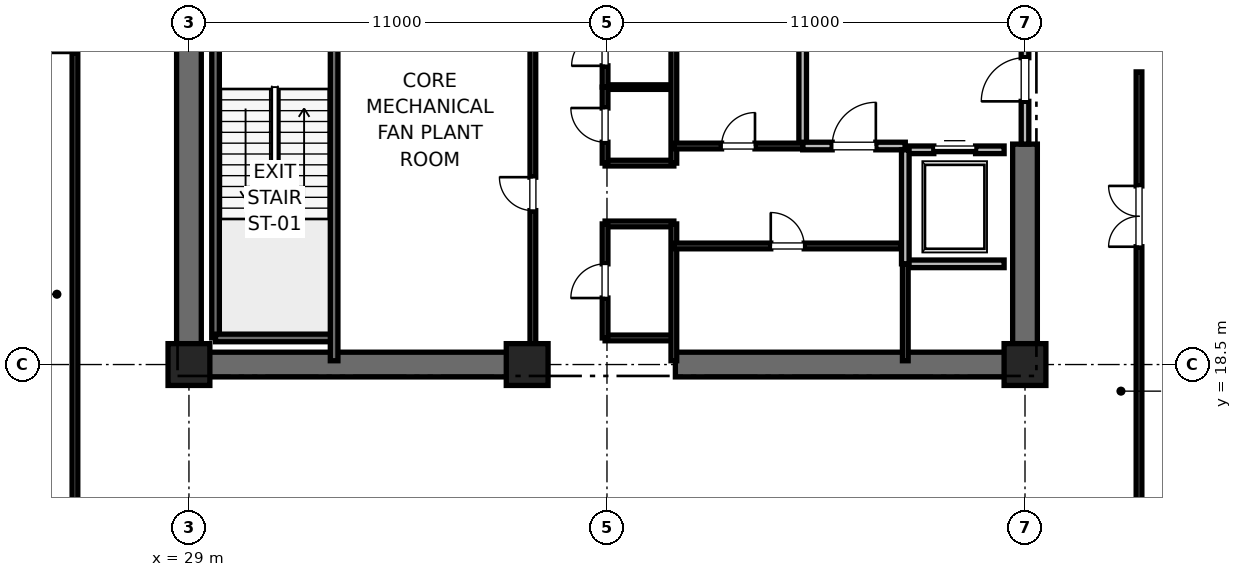
"""IFC4 building model, lengths in metres.
Left out: names, types, materials, properties, quantities, classifications, styles, units other than length and angle.
Written with IfcOpenShell. Run it as: python <this file> out.ifc"""

import sys

from ifc_helpers import new_model, si_unit, direction, frame, frame_2d, origin, origin_2d, place, context, subcontext, project, spatial, rectangle, extrude, element, fill, save


model = new_model("IFC4")
c1 = context("Model", 3, precision=1e-05, world=origin(), true_north=direction((0.0, 1.0)))
c2 = subcontext(c1, "Body", "Model", "MODEL_VIEW")
j1 = project(units=[si_unit("LENGTHUNIT", "METRE"), si_unit("PLANEANGLEUNIT", "RADIAN")], contexts=[c1])
p1 = place(None, origin())
s1 = spatial("IfcSite", under=j1, at=p1, CompositionType="ELEMENT")
p2 = place(p1, origin())
s2 = spatial("IfcBuilding", under=s1, at=p2, CompositionType="ELEMENT")
p3 = place(p2, frame((0.0, 0.0, -9.0)))
s3 = spatial("IfcBuildingStorey", under=s2, at=p3, CompositionType="ELEMENT", Elevation=-9.0)
for number, where, z_axis, x_axis in (
    (1, (29.0, 18.5, -0.3), (0.0, 0.0, 1.0), (1.0, 0.0, 0.0)),
    (2, (51.0, 18.5, -0.3), (0.0, 0.0, 1.0), (1.0, 0.0, 0.0)),
    (3, (37.9, 18.5, -0.3), (0.0, 0.0, 1.0), (1.0, 0.0, 0.0)),
):
    element("IfcColumn", number, at=place(p3, frame(where, z_axis=z_axis, x_axis=x_axis)), inside=s3, PredefinedType="PILASTER", context=c2, shape_type="SweptSolid", body=[
        extrude(rectangle(XDim=1.1, YDim=1.1, at=origin_2d()), origin(), (0.0, 0.0, 1.0), 4.8),
    ])
for number, where, z_axis, x_axis in (
    (4, (29.0, 18.5, -0.3), (0.0, 0.0, 1.0), (1.0, 0.0, 0.0)),
    (5, (41.8, 18.5, -0.3), (0.0, 0.0, 1.0), (1.0, 0.0, 0.0)),
):
    element("IfcWall", number, at=place(p3, frame(where, z_axis=z_axis, x_axis=x_axis)), inside=s3, PredefinedType="SHEAR", context=c2, shape_type="SweptSolid", body=[
        extrude(rectangle(XDim=9.2, YDim=0.65, at=frame_2d((4.6, 0.0))), origin(), (0.0, 0.0, 1.0), 4.5),
    ])
p4 = place(p3, frame((29.0, 18.5, -0.3), z_axis=(0.0, 0.0, 1.0), x_axis=(0.0, 1.0, 0.0)))
e6 = element("IfcWall", 6, at=p4, inside=s3, PredefinedType="SHEAR", context=c2, shape_type="SweptSolid", body=[
    extrude(rectangle(XDim=8.8, YDim=0.65, at=frame_2d((4.4, 0.0))), origin(), (0.0, 0.0, 1.0), 4.5),
])
p5 = place(p3, frame((51.0, 18.5, -0.3), z_axis=(0.0, 0.0, 1.0), x_axis=(0.0, 1.0, 0.0)))
e7 = element("IfcWall", 7, at=p5, inside=s3, PredefinedType="SHEAR", context=c2, shape_type="SweptSolid", body=[
    extrude(rectangle(XDim=5.8, YDim=0.65, at=frame_2d((2.9, 0.0))), origin(), (0.0, 0.0, 1.0), 4.5),
])
p6 = place(p3, frame((29.7, 19.2, -0.3), z_axis=(0.0, 0.0, 1.0), x_axis=(0.0, 1.0, 0.0)))
e8 = element("IfcWall", 8, at=p6, inside=s3, PredefinedType="SOLIDWALL", context=c2, shape_type="SweptSolid", body=[
    extrude(rectangle(XDim=8.15, YDim=0.2, at=frame_2d((4.075, 0.0))), origin(), (0.0, 0.0, 1.0), 4.5),
])
p7 = place(p3, frame((29.7, 19.2, -0.3), z_axis=(0.0, 0.0, 1.0), x_axis=(1.0, 0.0, 0.0)))
e9 = element("IfcWall", 9, at=p7, inside=s3, PredefinedType="SOLIDWALL", context=c2, shape_type="SweptSolid", body=[
    extrude(rectangle(XDim=3.12, YDim=0.2, at=frame_2d((1.56, 0.0))), origin(), (0.0, 0.0, 1.0), 4.5),
])
p8 = place(p3, frame((32.82, 18.6, -0.3), z_axis=(0.0, 0.0, 1.0), x_axis=(0.0, 1.0, 0.0)))
e10 = element("IfcWall", 10, at=p8, inside=s3, PredefinedType="SOLIDWALL", context=c2, shape_type="SweptSolid", body=[
    extrude(rectangle(XDim=8.78, YDim=0.2, at=frame_2d((4.39, 0.0))), origin(), (0.0, 0.0, 1.0), 4.5),
])
p9 = place(p3, frame((45.15, 24.25, 0.0), z_axis=(0.0, 0.0, 1.0), x_axis=(0.0, 1.0, 0.0)))
e11 = element("IfcWall", 11, at=p9, inside=s3, PredefinedType="PARTITIONING", context=c2, shape_type="SweptSolid", body=[
    extrude(rectangle(XDim=3.37, YDim=0.2, at=frame_2d((1.685, 0.0))), origin(), (0.0, 0.0, 1.0), 4.2),
])
p10 = place(p3, frame((45.15, 24.25, 0.0), z_axis=(0.0, 0.0, 1.0), x_axis=(1.0, 0.0, 0.0)))
e12 = element("IfcWall", 12, at=p10, inside=s3, PredefinedType="PARTITIONING", context=c2, shape_type="SweptSolid", body=[
    extrude(rectangle(XDim=2.7, YDim=0.2, at=frame_2d((1.35, 0.0))), origin(), (0.0, 0.0, 1.0), 4.2),
])
p11 = place(p10, frame((0.775, 0.0, 0.0)))
e13 = element("IfcOpeningElement", 13, at=p11, cuts=e12, PredefinedType="OPENING", context=c2, shape_type="SweptSolid", body=[
    extrude(rectangle(XDim=1.15, YDim=2.2, at=frame_2d((0.575, 1.1))), frame((0.0, 0.1, 0.0), z_axis=(0.0, -1.0, 0.0), x_axis=(1.0, 0.0, 0.0)), (0.0, 0.0, 1.0), 0.2),
])
p12 = place(p3, frame((51.0, 24.3, 0.0), z_axis=(0.0, 0.0, 1.0), x_axis=(0.0, 1.0, 0.0)))
e14 = element("IfcWall", 14, at=p12, inside=s3, PredefinedType="PARTITIONING", context=c2, shape_type="SweptSolid", body=[
    extrude(rectangle(XDim=3.4, YDim=0.2, at=frame_2d((1.7, 0.0))), origin(), (0.0, 0.0, 1.0), 2.98),
])
p13 = place(p12, frame((1.125, 0.0, 0.0)))
e15 = element("IfcOpeningElement", 15, at=p13, cuts=e14, PredefinedType="OPENING", context=c2, shape_type="SweptSolid", body=[
    extrude(rectangle(XDim=1.15, YDim=2.2, at=frame_2d((0.575, 1.1))), frame((0.0, 0.1, 0.0), z_axis=(0.0, -1.0, 0.0), x_axis=(1.0, 0.0, 0.0)), (0.0, 0.0, 1.0), 0.2),
])
p14 = place(p3, frame((47.85, 21.15, 0.0), z_axis=(0.0, 0.0, 1.0), x_axis=(1.0, 0.0, 0.0)))
e16 = element("IfcWall", 16, at=p14, inside=s3, PredefinedType="SOLIDWALL", context=c2, shape_type="SweptSolid", body=[
    extrude(rectangle(XDim=2.6, YDim=0.2, at=frame_2d((1.3, 0.0))), origin(), (0.0, 0.0, 1.0), 4.2),
])
p15 = place(p3, frame((50.45, 24.15, 0.0), z_axis=(0.0, 0.0, 1.0), x_axis=(-1.0, 0.0, 0.0)))
e17 = element("IfcWall", 17, at=p15, inside=s3, PredefinedType="SOLIDWALL", context=c2, shape_type="SweptSolid", body=[
    extrude(rectangle(XDim=2.6, YDim=0.2, at=frame_2d((1.3, 0.0))), origin(), (0.0, 0.0, 1.0), 2.98),
])
p16 = place(p15, frame((0.75, 0.0, 0.0)))
e18 = element("IfcOpeningElement", 18, at=p16, cuts=e17, PredefinedType="OPENING", context=c2, shape_type="SweptSolid", body=[
    extrude(rectangle(XDim=1.1, YDim=2.2, at=frame_2d((0.55, 1.1))), frame((0.0, 0.1, 0.0), z_axis=(0.0, -1.0, 0.0), x_axis=(1.0, 0.0, 0.0)), (0.0, 0.0, 1.0), 0.2),
])
p17 = place(p3, frame((47.85, 24.15, 0.0), z_axis=(0.0, 0.0, 1.0), x_axis=(0.0, -1.0, 0.0)))
e19 = element("IfcWall", 19, at=p17, inside=s3, PredefinedType="SOLIDWALL", context=c2, shape_type="SweptSolid", body=[
    extrude(rectangle(XDim=3.0, YDim=0.2, at=frame_2d((1.5, 0.0))), origin(), (0.0, 0.0, 1.0), 4.2),
])
for number, where, z_axis, x_axis in (
    (20, (39.95, 19.2, 0.0), (0.0, 0.0, 1.0), (1.0, 0.0, 0.0)),
    (21, (39.95, 22.2, 0.0), (0.0, 0.0, 1.0), (1.0, 0.0, 0.0)),
    (22, (39.95, 23.8, 0.0), (0.0, 0.0, 1.0), (1.0, 0.0, 0.0)),
):
    element("IfcWall", number, at=place(p3, frame(where, z_axis=z_axis, x_axis=x_axis)), inside=s3, PredefinedType="PARTITIONING", context=c2, shape_type="SweptSolid", body=[
        extrude(rectangle(XDim=1.81, YDim=0.15, at=frame_2d((0.905, 0.0))), origin(), (0.0, 0.0, 1.0), 2.85),
    ])
p18 = place(p3, frame((39.95, 25.8, 0.0), z_axis=(0.0, 0.0, 1.0), x_axis=(1.0, 0.0, 0.0)))
e23 = element("IfcWall", 23, at=p18, inside=s3, PredefinedType="PARTITIONING", context=c2, shape_type="SweptSolid", body=[
    extrude(rectangle(XDim=1.81, YDim=0.12, at=frame_2d((0.905, 0.0))), origin(), (0.0, 0.0, 1.0), 2.85),
])
p19 = place(p3, frame((41.76, 18.6, 0.0), z_axis=(0.0, 0.0, 1.0), x_axis=(0.0, 1.0, 0.0)))
e24 = element("IfcWall", 24, at=p19, inside=s3, PredefinedType="PARTITIONING", context=c2, shape_type="SweptSolid", body=[
    extrude(rectangle(XDim=3.6, YDim=0.15, at=frame_2d((1.8, 0.0))), origin(), (0.0, 0.0, 1.0), 2.85),
])
p20 = place(p3, frame((41.76, 23.8, 0.0), z_axis=(0.0, 0.0, 1.0), x_axis=(0.0, 1.0, 0.0)))
e25 = element("IfcWall", 25, at=p20, inside=s3, PredefinedType="PARTITIONING", context=c2, shape_type="SweptSolid", body=[
    extrude(rectangle(XDim=4.0, YDim=0.15, at=frame_2d((2.0, 0.0))), origin(), (0.0, 0.0, 1.0), 2.85),
])
p21 = place(p3, frame((39.95, 19.2, 0.0), z_axis=(0.0, 0.0, 1.0), x_axis=(0.0, 1.0, 0.0)))
e26 = element("IfcWall", 26, at=p21, inside=s3, PredefinedType="PARTITIONING", context=c2, shape_type="SweptSolid", body=[
    extrude(rectangle(XDim=3.0, YDim=0.15, at=frame_2d((1.5, 0.0))), origin(), (0.0, 0.0, 1.0), 2.85),
])
p22 = place(p21, frame((1.05, 0.0, 0.0)))
e27 = element("IfcOpeningElement", 27, at=p22, cuts=e26, PredefinedType="OPENING", context=c2, shape_type="SweptSolid", body=[
    extrude(rectangle(XDim=0.9, YDim=2.1, at=frame_2d((0.45, 1.05))), frame((0.0, 0.075, 0.0), z_axis=(0.0, -1.0, 0.0), x_axis=(1.0, 0.0, 0.0)), (0.0, 0.0, 1.0), 0.15),
])
p23 = place(p3, frame((39.95, 23.8, 0.0), z_axis=(0.0, 0.0, 1.0), x_axis=(0.0, 1.0, 0.0)))
e28 = element("IfcWall", 28, at=p23, inside=s3, PredefinedType="PARTITIONING", context=c2, shape_type="SweptSolid", body=[
    extrude(rectangle(XDim=2.0, YDim=0.15, at=frame_2d((1.0, 0.0))), origin(), (0.0, 0.0, 1.0), 2.85),
])
p24 = place(p23, frame((0.55, 0.0, 0.0)))
e29 = element("IfcOpeningElement", 29, at=p24, cuts=e28, PredefinedType="OPENING", context=c2, shape_type="SweptSolid", body=[
    extrude(rectangle(XDim=0.9, YDim=2.1, at=frame_2d((0.45, 1.05))), frame((0.0, 0.075, 0.0), z_axis=(0.0, -1.0, 0.0), x_axis=(1.0, 0.0, 0.0)), (0.0, 0.0, 1.0), 0.15),
])
p25 = place(p3, frame((39.95, 25.8, 0.0), z_axis=(0.0, 0.0, 1.0), x_axis=(0.0, 1.0, 0.0)))
e30 = element("IfcWall", 30, at=p25, inside=s3, PredefinedType="PARTITIONING", context=c2, shape_type="SweptSolid", body=[
    extrude(rectangle(XDim=2.0, YDim=0.15, at=frame_2d((1.0, 0.0))), origin(), (0.0, 0.0, 1.0), 2.85),
])
p26 = place(p25, frame((0.56, 0.0, 0.0)))
e31 = element("IfcOpeningElement", 31, at=p26, cuts=e30, PredefinedType="OPENING", context=c2, shape_type="SweptSolid", body=[
    extrude(rectangle(XDim=0.88, YDim=2.1, at=frame_2d((0.44, 1.05))), frame((0.0, 0.075, 0.0), z_axis=(0.0, -1.0, 0.0), x_axis=(1.0, 0.0, 0.0)), (0.0, 0.0, 1.0), 0.15),
])
p27 = place(p3, frame((38.05, 18.6, 0.0), z_axis=(0.0, 0.0, 1.0), x_axis=(0.0, 1.0, 0.0)))
e32 = element("IfcWall", 32, at=p27, inside=s3, PredefinedType="PARTITIONING", context=c2, shape_type="SweptSolid", body=[
    extrude(rectangle(XDim=8.78, YDim=0.15, at=frame_2d((4.39, 0.0))), origin(), (0.0, 0.0, 1.0), 2.85),
])
p28 = place(p27, frame((3.95, 0.0, 0.0)))
e33 = element("IfcOpeningElement", 33, at=p28, cuts=e32, PredefinedType="OPENING", context=c2, shape_type="SweptSolid", body=[
    extrude(rectangle(XDim=0.88, YDim=2.1, at=frame_2d((0.44, 1.05))), frame((0.0, 0.075, 0.0), z_axis=(0.0, -1.0, 0.0), x_axis=(1.0, 0.0, 0.0)), (0.0, 0.0, 1.0), 0.15),
])
p29 = place(p3, frame((47.85, 18.6, 0.0), z_axis=(0.0, 0.0, 1.0), x_axis=(0.0, 1.0, 0.0)))
e34 = element("IfcWall", 34, at=p29, inside=s3, PredefinedType="PARTITIONING", context=c2, shape_type="SweptSolid", body=[
    extrude(rectangle(XDim=2.54, YDim=0.15, at=frame_2d((1.27, 0.0))), origin(), (0.0, 0.0, 1.0), 2.85),
])
p30 = place(p3, frame((41.76, 21.62, 0.0), z_axis=(0.0, 0.0, 1.0), x_axis=(1.0, 0.0, 0.0)))
e35 = element("IfcWall", 35, at=p30, inside=s3, PredefinedType="PARTITIONING", context=c2, shape_type="SweptSolid", body=[
    extrude(rectangle(XDim=5.98, YDim=0.15, at=frame_2d((2.99, 0.0))), origin(), (0.0, 0.0, 1.0), 2.85),
])
p31 = place(p30, frame((2.55, 0.0, 0.0)))
e36 = element("IfcOpeningElement", 36, at=p31, cuts=e35, PredefinedType="OPENING", context=c2, shape_type="SweptSolid", body=[
    extrude(rectangle(XDim=0.88, YDim=2.1, at=frame_2d((0.44, 1.05))), frame((0.0, 0.075, 0.0), z_axis=(0.0, -1.0, 0.0), x_axis=(1.0, 0.0, 0.0)), (0.0, 0.0, 1.0), 0.15),
])
p32 = place(p3, frame((41.76, 24.25, 0.0), z_axis=(0.0, 0.0, 1.0), x_axis=(1.0, 0.0, 0.0)))
e37 = element("IfcWall", 37, at=p32, inside=s3, PredefinedType="PARTITIONING", context=c2, shape_type="SweptSolid", body=[
    extrude(rectangle(XDim=3.39, YDim=0.15, at=frame_2d((1.695, 0.0))), origin(), (0.0, 0.0, 1.0), 2.85),
])
p33 = place(p32, frame((1.255, 0.0, 0.0)))
e38 = element("IfcOpeningElement", 38, at=p33, cuts=e37, PredefinedType="OPENING", context=c2, shape_type="SweptSolid", body=[
    extrude(rectangle(XDim=0.88, YDim=2.1, at=frame_2d((0.44, 1.05))), frame((0.0, 0.075, 0.0), z_axis=(0.0, -1.0, 0.0), x_axis=(1.0, 0.0, 0.0)), (0.0, 0.0, 1.0), 0.15),
])
p34 = place(p3, frame((26.0, 14.0, 0.0), z_axis=(0.0, 0.0, 1.0), x_axis=(0.0, 1.0, 0.0)))
e39 = element("IfcWall", 39, at=p34, inside=s3, PredefinedType="PARTITIONING", context=c2, shape_type="SweptSolid", body=[
    extrude(rectangle(XDim=25.0, YDim=0.15, at=frame_2d((12.5, 0.0))), origin(), (0.0, 0.0, 1.0), 2.85),
])
p35 = place(p34, frame((12.7, 0.0, 0.0)))
e40 = element("IfcOpeningElement", 40, at=p35, cuts=e39, PredefinedType="OPENING", context=c2, shape_type="SweptSolid", body=[
    extrude(rectangle(XDim=1.6, YDim=2.25, at=frame_2d((0.8, 1.125))), frame((0.0, 0.075, 0.0), z_axis=(0.0, -1.0, 0.0), x_axis=(1.0, 0.0, 0.0)), (0.0, 0.0, 1.0), 0.15),
])
p36 = place(p3, frame((54.0, 14.0, 0.0), z_axis=(0.0, 0.0, 1.0), x_axis=(0.0, 1.0, 0.0)))
e41 = element("IfcWall", 41, at=p36, inside=s3, PredefinedType="PARTITIONING", context=c2, shape_type="SweptSolid", body=[
    extrude(rectangle(XDim=12.2, YDim=0.15, at=frame_2d((6.1, 0.0))), origin(), (0.0, 0.0, 1.0), 2.85),
])
p37 = place(p36, frame((7.6, 0.0, 0.0)))
e42 = element("IfcOpeningElement", 42, at=p37, cuts=e41, PredefinedType="OPENING", context=c2, shape_type="SweptSolid", body=[
    extrude(rectangle(XDim=1.6, YDim=2.25, at=frame_2d((0.8, 1.125))), frame((0.0, 0.075, 0.0), z_axis=(0.0, -1.0, 0.0), x_axis=(1.0, 0.0, 0.0)), (0.0, 0.0, 1.0), 0.15),
])
p38 = place(p11, origin())
e43 = element("IfcDoor", 43, at=p38, inside=s3, OperationType="SINGLE_SWING_RIGHT", PredefinedType="DOOR", context=c2, shape_type="SweptSolid", body=[
    extrude(rectangle(XDim=1.15, YDim=2.2, at=frame_2d((0.575, 1.1))), frame((0.0, 0.025, 0.0), z_axis=(0.0, -1.0, 0.0), x_axis=(1.0, 0.0, 0.0)), (0.0, 0.0, 1.0), 0.05),
])
fill(e13, e43)
p39 = place(p13, origin())
e44 = element("IfcDoor", 44, at=p39, inside=s3, OperationType="SINGLE_SWING_LEFT", PredefinedType="DOOR", context=c2, shape_type="SweptSolid", body=[
    extrude(rectangle(XDim=1.15, YDim=2.2, at=frame_2d((0.575, 1.1))), frame((0.0, 0.025, 0.0), z_axis=(0.0, -1.0, 0.0), x_axis=(1.0, 0.0, 0.0)), (0.0, 0.0, 1.0), 0.05),
])
fill(e15, e44)
p40 = place(p16, origin())
e45 = element("IfcDoor", 45, at=p40, inside=s3, OperationType="SLIDING_TO_RIGHT", PredefinedType="DOOR", context=c2, shape_type="SweptSolid", body=[
    extrude(rectangle(XDim=1.1, YDim=2.2, at=frame_2d((0.55, 1.1))), frame((0.0, 0.025, 0.0), z_axis=(0.0, -1.0, 0.0), x_axis=(1.0, 0.0, 0.0)), (0.0, 0.0, 1.0), 0.05),
])
fill(e18, e45)
p41 = place(p22, origin())
e46 = element("IfcDoor", 46, at=p41, inside=s3, OperationType="SINGLE_SWING_LEFT", PredefinedType="DOOR", context=c2, shape_type="SweptSolid", body=[
    extrude(rectangle(XDim=0.9, YDim=2.1, at=frame_2d((0.45, 1.05))), frame((0.0, 0.025, 0.0), z_axis=(0.0, -1.0, 0.0), x_axis=(1.0, 0.0, 0.0)), (0.0, 0.0, 1.0), 0.05),
])
fill(e27, e46)
p42 = place(p24, origin())
e47 = element("IfcDoor", 47, at=p42, inside=s3, OperationType="SINGLE_SWING_RIGHT", PredefinedType="DOOR", context=c2, shape_type="SweptSolid", body=[
    extrude(rectangle(XDim=0.9, YDim=2.1, at=frame_2d((0.45, 1.05))), frame((0.0, 0.025, 0.0), z_axis=(0.0, -1.0, 0.0), x_axis=(1.0, 0.0, 0.0)), (0.0, 0.0, 1.0), 0.05),
])
fill(e29, e47)
p43 = place(p26, origin())
e48 = element("IfcDoor", 48, at=p43, inside=s3, OperationType="SINGLE_SWING_LEFT", PredefinedType="DOOR", context=c2, shape_type="SweptSolid", body=[
    extrude(rectangle(XDim=0.88, YDim=2.1, at=frame_2d((0.44, 1.05))), frame((0.0, 0.025, 0.0), z_axis=(0.0, -1.0, 0.0), x_axis=(1.0, 0.0, 0.0)), (0.0, 0.0, 1.0), 0.05),
])
fill(e31, e48)
p44 = place(p28, origin())
e49 = element("IfcDoor", 49, at=p44, inside=s3, OperationType="SINGLE_SWING_RIGHT", PredefinedType="DOOR", context=c2, shape_type="SweptSolid", body=[
    extrude(rectangle(XDim=0.88, YDim=2.1, at=frame_2d((0.44, 1.05))), frame((0.0, 0.025, 0.0), z_axis=(0.0, -1.0, 0.0), x_axis=(1.0, 0.0, 0.0)), (0.0, 0.0, 1.0), 0.05),
])
fill(e33, e49)
p45 = place(p31, origin())
e50 = element("IfcDoor", 50, at=p45, inside=s3, OperationType="SINGLE_SWING_LEFT", PredefinedType="DOOR", context=c2, shape_type="SweptSolid", body=[
    extrude(rectangle(XDim=0.88, YDim=2.1, at=frame_2d((0.44, 1.05))), frame((0.0, 0.025, 0.0), z_axis=(0.0, -1.0, 0.0), x_axis=(1.0, 0.0, 0.0)), (0.0, 0.0, 1.0), 0.05),
])
fill(e36, e50)
p46 = place(p33, origin())
e51 = element("IfcDoor", 51, at=p46, inside=s3, OperationType="SINGLE_SWING_RIGHT", PredefinedType="DOOR", context=c2, shape_type="SweptSolid", body=[
    extrude(rectangle(XDim=0.88, YDim=2.1, at=frame_2d((0.44, 1.05))), frame((0.0, 0.025, 0.0), z_axis=(0.0, -1.0, 0.0), x_axis=(1.0, 0.0, 0.0)), (0.0, 0.0, 1.0), 0.05),
])
fill(e38, e51)
p47 = place(p35, origin())
e52 = element("IfcDoor", 52, at=p47, inside=s3, OperationType="DOUBLE_DOOR_SINGLE_SWING", PredefinedType="DOOR", context=c2, shape_type="SweptSolid", body=[
    extrude(rectangle(XDim=1.6, YDim=2.25, at=frame_2d((0.8, 1.125))), frame((0.0, 0.025, 0.0), z_axis=(0.0, -1.0, 0.0), x_axis=(1.0, 0.0, 0.0)), (0.0, 0.0, 1.0), 0.05),
])
fill(e40, e52)
p48 = place(p37, origin())
e53 = element("IfcDoor", 53, at=p48, inside=s3, OperationType="DOUBLE_DOOR_SINGLE_SWING", PredefinedType="DOOR", context=c2, shape_type="SweptSolid", body=[
    extrude(rectangle(XDim=1.6, YDim=2.25, at=frame_2d((0.8, 1.125))), frame((0.0, 0.025, 0.0), z_axis=(0.0, -1.0, 0.0), x_axis=(1.0, 0.0, 0.0)), (0.0, 0.0, 1.0), 0.05),
])
fill(e42, e53)
save(model, sys.argv[1])
